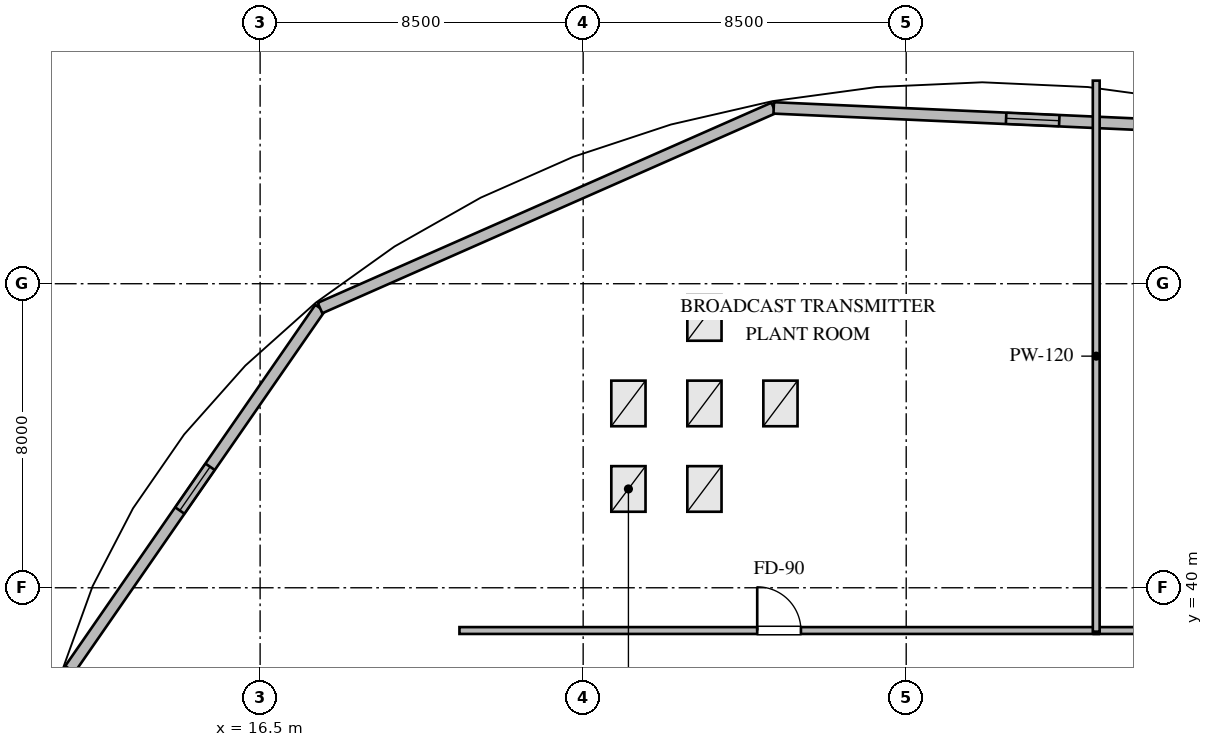
"""IFC4 building model, lengths in metres.
Left out: names, types, materials, properties, quantities, classifications, styles, units other than length and angle.
Written with IfcOpenShell. Run it as: python <this file> out.ifc"""

import sys

from ifc_helpers import new_model, si_unit, direction, frame, frame_2d, origin, place, context, subcontext, project, spatial, rectangle, extrude, element, fill, save


model = new_model("IFC4")
c1 = context("Model", 3, precision=1e-05, world=origin(), true_north=direction((0.0, 1.0)))
c2 = subcontext(c1, "Body", "Model", "MODEL_VIEW")
j1 = project(units=[si_unit("LENGTHUNIT", "METRE"), si_unit("PLANEANGLEUNIT", "RADIAN")], contexts=[c1])
p1 = place(None, origin())
s1 = spatial("IfcSite", under=j1, at=p1, CompositionType="ELEMENT")
p2 = place(p1, origin())
s2 = spatial("IfcBuilding", under=s1, at=p2, CompositionType="ELEMENT")
p3 = place(p2, frame((0.0, 0.0, 304.8)))
s3 = spatial("IfcBuildingStorey", under=s2, at=p3, CompositionType="ELEMENT", Elevation=304.8)
p4 = place(p3, frame((11.495, 37.856, 0.0), z_axis=(0.0, 0.0, 1.0), x_axis=(0.569269280193, 0.822151133691, 0.0)))
e1 = element("IfcWall", 1, at=p4, inside=s3, PredefinedType="STANDARD", context=c2, shape_type="SweptSolid", body=[
    extrude(rectangle(XDim=11.56, YDim=0.3, at=frame_2d((5.78, 0.0))), origin(), (0.0, 0.0, 1.0), 3.72),
])
p5 = place(p4, frame((5.08, 0.0, 1.2)))
e2 = element("IfcOpeningElement", 2, at=p5, cuts=e1, PredefinedType="OPENING", context=c2, shape_type="SweptSolid", body=[
    extrude(rectangle(XDim=1.4, YDim=1.2, at=frame_2d((0.7, 0.6))), frame((0.0, 0.16, 0.0), z_axis=(0.0, -1.0, 0.0), x_axis=(1.0, 0.0, 0.0)), (0.0, 0.0, 1.0), 0.32),
])
p6 = place(p3, frame((18.076, 47.36, 0.0), z_axis=(0.0, 0.0, 1.0), x_axis=(0.914943001047, 0.40358308294, 0.0)))
e3 = element("IfcWall", 3, at=p6, inside=s3, PredefinedType="STANDARD", context=c2, shape_type="SweptSolid", body=[
    extrude(rectangle(XDim=13.048, YDim=0.3, at=frame_2d((6.524, 0.0))), origin(), (0.0, 0.0, 1.0), 3.72),
])
p7 = place(p3, frame((30.014, 52.626, 0.0), z_axis=(0.0, 0.0, 1.0), x_axis=(0.998996211569, -0.04479474602, 0.0)))
e4 = element("IfcWall", 4, at=p7, inside=s3, PredefinedType="STANDARD", context=c2, shape_type="SweptSolid", body=[
    extrude(rectangle(XDim=13.642, YDim=0.3, at=frame_2d((6.821, 0.0))), origin(), (0.0, 0.0, 1.0), 3.72),
])
p8 = place(p7, frame((6.121, 0.0, 1.2)))
e5 = element("IfcOpeningElement", 5, at=p8, cuts=e4, PredefinedType="OPENING", context=c2, shape_type="SweptSolid", body=[
    extrude(rectangle(XDim=1.4, YDim=1.2, at=frame_2d((0.7, 0.6))), frame((0.0, 0.16, 0.0), z_axis=(0.0, -1.0, 0.0), x_axis=(1.0, 0.0, 0.0)), (0.0, 0.0, 1.0), 0.32),
])
p9 = place(p3, frame((21.745, 38.875, 0.0), z_axis=(0.0, 0.0, 1.0), x_axis=(1.0, 0.0, 0.0)))
e6 = element("IfcWall", 6, at=p9, inside=s3, PredefinedType="PARTITIONING", context=c2, shape_type="SweptSolid", body=[
    extrude(rectangle(XDim=16.82, YDim=0.18, at=frame_2d((8.41, 0.0))), origin(), (0.0, 0.0, 1.0), 3.72),
])
p10 = place(p9, frame((7.835, 0.0, 0.0)))
e7 = element("IfcOpeningElement", 7, at=p10, cuts=e6, PredefinedType="OPENING", context=c2, shape_type="SweptSolid", body=[
    extrude(rectangle(XDim=1.15, YDim=2.1, at=frame_2d((0.575, 1.05))), frame((0.0, 0.1, 0.0), z_axis=(0.0, -1.0, 0.0), x_axis=(1.0, 0.0, 0.0)), (0.0, 0.0, 1.0), 0.2),
])
p11 = place(p3, frame((38.435, 38.875, 0.0), z_axis=(0.0, 0.0, 1.0), x_axis=(1.0, 0.0, 0.0)))
e8 = element("IfcWall", 8, at=p11, inside=s3, PredefinedType="PARTITIONING", context=c2, shape_type="SweptSolid", body=[
    extrude(rectangle(XDim=8.02, YDim=0.18, at=frame_2d((4.01, 0.0))), origin(), (0.0, 0.0, 1.0), 3.72),
])
p12 = place(p11, frame((3.435, 0.0, 0.0)))
e9 = element("IfcOpeningElement", 9, at=p12, cuts=e8, PredefinedType="OPENING", context=c2, shape_type="SweptSolid", body=[
    extrude(rectangle(XDim=1.15, YDim=2.1, at=frame_2d((0.575, 1.05))), frame((0.0, 0.1, 0.0), z_axis=(0.0, -1.0, 0.0), x_axis=(1.0, 0.0, 0.0)), (0.0, 0.0, 1.0), 0.2),
])
p13 = place(p3, frame((38.5, 53.344, 0.0), z_axis=(0.0, 0.0, 1.0), x_axis=(0.0, -1.0, 0.0)))
e10 = element("IfcWall", 10, at=p13, inside=s3, PredefinedType="PARTITIONING", context=c2, shape_type="SweptSolid", body=[
    extrude(rectangle(XDim=14.499, YDim=0.18, at=frame_2d((7.25, 0.0))), origin(), (0.0, 0.0, 1.0), 3.72),
])
p14 = place(p5, origin())
e11 = element("IfcWindow", 11, at=p14, inside=s3, PartitioningType="SINGLE_PANEL", PredefinedType="WINDOW", context=c2, shape_type="SweptSolid", body=[
    extrude(rectangle(XDim=1.4, YDim=1.2, at=frame_2d((0.7, 0.6))), frame((0.0, 0.03, 0.0), z_axis=(0.0, -1.0, 0.0), x_axis=(1.0, 0.0, 0.0)), (0.0, 0.0, 1.0), 0.06),
])
fill(e2, e11)
p15 = place(p8, origin())
e12 = element("IfcWindow", 12, at=p15, inside=s3, PartitioningType="SINGLE_PANEL", PredefinedType="WINDOW", context=c2, shape_type="SweptSolid", body=[
    extrude(rectangle(XDim=1.4, YDim=1.2, at=frame_2d((0.7, 0.6))), frame((0.0, 0.03, 0.0), z_axis=(0.0, -1.0, 0.0), x_axis=(1.0, 0.0, 0.0)), (0.0, 0.0, 1.0), 0.06),
])
fill(e5, e12)
p16 = place(p10, origin())
e13 = element("IfcDoor", 13, at=p16, inside=s3, OperationType="SINGLE_SWING_LEFT", PredefinedType="DOOR", context=c2, shape_type="SweptSolid", body=[
    extrude(rectangle(XDim=1.15, YDim=2.1, at=frame_2d((0.575, 1.05))), frame((0.0, 0.025, 0.0), z_axis=(0.0, -1.0, 0.0), x_axis=(1.0, 0.0, 0.0)), (0.0, 0.0, 1.0), 0.05),
])
fill(e7, e13)
save(model, sys.argv[1])
